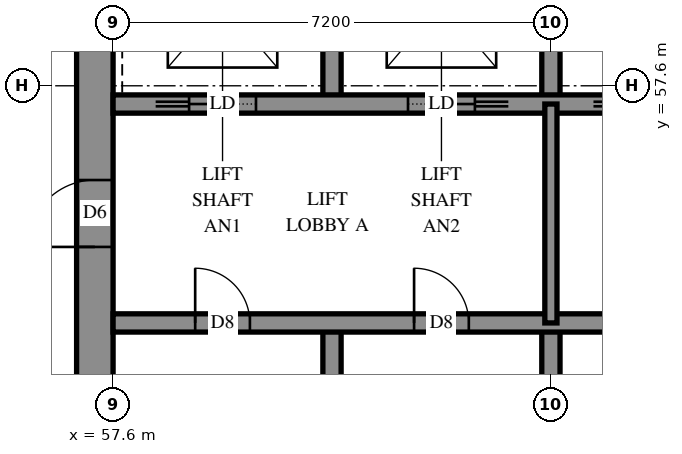
"""IFC4 building model, lengths in metres.
Left out: names, types, materials, properties, quantities, classifications, styles, units other than length and angle.
Written with IfcOpenShell. Run it as: python <this file> out.ifc"""

import sys

from ifc_helpers import new_model, si_unit, direction, frame, frame_2d, origin, place, context, subcontext, project, spatial, rectangle, extrude, element, fill, save


model = new_model("IFC4")
c1 = context("Model", 3, precision=1e-05, world=origin(), true_north=direction((0.0, 1.0)))
c2 = subcontext(c1, "Body", "Model", "MODEL_VIEW")
j1 = project(units=[si_unit("LENGTHUNIT", "METRE"), si_unit("PLANEANGLEUNIT", "RADIAN")], contexts=[c1])
p1 = place(None, origin())
s1 = spatial("IfcSite", under=j1, at=p1, CompositionType="ELEMENT")
p2 = place(p1, origin())
s2 = spatial("IfcBuilding", under=s1, at=p2, CompositionType="ELEMENT")
p3 = place(p2, frame((0.0, 0.0, 166.0)))
s3 = spatial("IfcBuildingStorey", under=s2, at=p3, CompositionType="ELEMENT", Elevation=166.0)
p4 = place(p3, frame((57.3, 50.4, -0.3), z_axis=(0.0, 0.0, 1.0), x_axis=(0.0, 1.0, 0.0)))
e1 = element("IfcWall", 1, at=p4, inside=s3, PredefinedType="SHEAR", context=c2, shape_type="SweptSolid", body=[
    extrude(rectangle(XDim=14.4, YDim=0.6, at=frame_2d((7.2, 0.0))), origin(), (0.0, 0.0, 1.0), 2.7),
])
p5 = place(p4, frame((4.55, 0.0, 0.3)))
e2 = element("IfcOpeningElement", 2, at=p5, cuts=e1, PredefinedType="OPENING", context=c2, shape_type="SweptSolid", body=[
    extrude(rectangle(XDim=1.1, YDim=2.1, at=frame_2d((0.55, 1.05))), frame((0.0, 0.31, 0.0), z_axis=(0.0, -1.0, 0.0), x_axis=(1.0, 0.0, 0.0)), (0.0, 0.0, 1.0), 0.62),
])
p6 = place(p4, frame((11.35, 0.0, 0.3)))
e3 = element("IfcOpeningElement", 3, at=p6, cuts=e1, PredefinedType="OPENING", context=c2, shape_type="SweptSolid", body=[
    extrude(rectangle(XDim=1.1, YDim=2.1, at=frame_2d((0.55, 1.05))), frame((0.0, 0.31, 0.0), z_axis=(0.0, -1.0, 0.0), x_axis=(1.0, 0.0, 0.0)), (0.0, 0.0, 1.0), 0.62),
])
for number, where, z_axis, x_axis in (
    (4, (61.2, 50.4, 0.0), (0.0, 0.0, 1.0), (0.0, 1.0, 0.0)),
    (5, (61.2, 57.3, 0.0), (0.0, 0.0, 1.0), (0.0, 1.0, 0.0)),
    (6, (64.8, 50.4, 0.0), (0.0, 0.0, 1.0), (0.0, 1.0, 0.0)),
    (7, (64.8, 57.3, 0.0), (0.0, 0.0, 1.0), (0.0, 1.0, 0.0)),
):
    element("IfcWall", number, at=place(p3, frame(where, z_axis=z_axis, x_axis=x_axis)), inside=s3, PredefinedType="SOLIDWALL", context=c2, shape_type="SweptSolid", body=[
        extrude(rectangle(XDim=3.3, YDim=0.3, at=frame_2d((1.65, 0.0))), origin(), (0.0, 0.0, 1.0), 3.1),
    ])
p7 = place(p3, frame((57.6, 53.7, 0.0), z_axis=(0.0, 0.0, 1.0), x_axis=(1.0, 0.0, 0.0)))
e8 = element("IfcWall", 8, at=p7, inside=s3, PredefinedType="SOLIDWALL", context=c2, shape_type="SweptSolid", body=[
    extrude(rectangle(XDim=14.4, YDim=0.3, at=frame_2d((7.2, 0.0))), origin(), (0.0, 0.0, 1.0), 3.1),
])
p8 = place(p7, frame((1.35, 0.0, 0.0)))
e9 = element("IfcOpeningElement", 9, at=p8, cuts=e8, PredefinedType="OPENING", context=c2, shape_type="SweptSolid", body=[
    extrude(rectangle(XDim=0.9, YDim=2.1, at=frame_2d((0.45, 1.05))), frame((0.0, 0.16, 0.0), z_axis=(0.0, -1.0, 0.0), x_axis=(1.0, 0.0, 0.0)), (0.0, 0.0, 1.0), 0.32),
])
p9 = place(p7, frame((4.95, 0.0, 0.0)))
e10 = element("IfcOpeningElement", 10, at=p9, cuts=e8, PredefinedType="OPENING", context=c2, shape_type="SweptSolid", body=[
    extrude(rectangle(XDim=0.9, YDim=2.1, at=frame_2d((0.45, 1.05))), frame((0.0, 0.16, 0.0), z_axis=(0.0, -1.0, 0.0), x_axis=(1.0, 0.0, 0.0)), (0.0, 0.0, 1.0), 0.32),
])
p10 = place(p7, frame((8.55, 0.0, 0.0)))
e11 = element("IfcOpeningElement", 11, at=p10, cuts=e8, PredefinedType="OPENING", context=c2, shape_type="SweptSolid", body=[
    extrude(rectangle(XDim=0.9, YDim=2.1, at=frame_2d((0.45, 1.05))), frame((0.0, 0.16, 0.0), z_axis=(0.0, -1.0, 0.0), x_axis=(1.0, 0.0, 0.0)), (0.0, 0.0, 1.0), 0.32),
])
p11 = place(p7, frame((12.05, 0.0, 0.0)))
e12 = element("IfcOpeningElement", 12, at=p11, cuts=e8, PredefinedType="OPENING", context=c2, shape_type="SweptSolid", body=[
    extrude(rectangle(XDim=1.1, YDim=2.1, at=frame_2d((0.55, 1.05))), frame((0.0, 0.16, 0.0), z_axis=(0.0, -1.0, 0.0), x_axis=(1.0, 0.0, 0.0)), (0.0, 0.0, 1.0), 0.32),
])
p12 = place(p3, frame((57.6, 57.3, 0.0), z_axis=(0.0, 0.0, 1.0), x_axis=(1.0, 0.0, 0.0)))
e13 = element("IfcWall", 13, at=p12, inside=s3, PredefinedType="SOLIDWALL", context=c2, shape_type="SweptSolid", body=[
    extrude(rectangle(XDim=14.4, YDim=0.3, at=frame_2d((7.2, 0.0))), origin(), (0.0, 0.0, 1.0), 3.1),
])
p13 = place(p12, frame((1.25, 0.0, 0.0)))
e14 = element("IfcOpeningElement", 14, at=p13, cuts=e13, PredefinedType="OPENING", context=c2, shape_type="SweptSolid", body=[
    extrude(rectangle(XDim=1.1, YDim=2.1, at=frame_2d((0.55, 1.05))), frame((0.0, 0.16, 0.0), z_axis=(0.0, -1.0, 0.0), x_axis=(1.0, 0.0, 0.0)), (0.0, 0.0, 1.0), 0.32),
])
p14 = place(p12, frame((4.85, 0.0, 0.0)))
e15 = element("IfcOpeningElement", 15, at=p14, cuts=e13, PredefinedType="OPENING", context=c2, shape_type="SweptSolid", body=[
    extrude(rectangle(XDim=1.1, YDim=2.1, at=frame_2d((0.55, 1.05))), frame((0.0, 0.16, 0.0), z_axis=(0.0, -1.0, 0.0), x_axis=(1.0, 0.0, 0.0)), (0.0, 0.0, 1.0), 0.32),
])
p15 = place(p12, frame((8.45, 0.0, 0.0)))
e16 = element("IfcOpeningElement", 16, at=p15, cuts=e13, PredefinedType="OPENING", context=c2, shape_type="SweptSolid", body=[
    extrude(rectangle(XDim=1.1, YDim=2.1, at=frame_2d((0.55, 1.05))), frame((0.0, 0.16, 0.0), z_axis=(0.0, -1.0, 0.0), x_axis=(1.0, 0.0, 0.0)), (0.0, 0.0, 1.0), 0.32),
])
p16 = place(p12, frame((12.05, 0.0, 0.0)))
e17 = element("IfcOpeningElement", 17, at=p16, cuts=e13, PredefinedType="OPENING", context=c2, shape_type="SweptSolid", body=[
    extrude(rectangle(XDim=1.1, YDim=2.1, at=frame_2d((0.55, 1.05))), frame((0.0, 0.16, 0.0), z_axis=(0.0, -1.0, 0.0), x_axis=(1.0, 0.0, 0.0)), (0.0, 0.0, 1.0), 0.32),
])
p17 = place(p3, frame((64.8, 53.7, 0.0), z_axis=(0.0, 0.0, 1.0), x_axis=(0.0, 1.0, 0.0)))
e18 = element("IfcWall", 18, at=p17, inside=s3, PredefinedType="PARTITIONING", context=c2, shape_type="SweptSolid", body=[
    extrude(rectangle(XDim=3.6, YDim=0.2, at=frame_2d((1.8, 0.0))), origin(), (0.0, 0.0, 1.0), 3.1),
])
p18 = place(p5, origin())
e19 = element("IfcDoor", 19, at=p18, inside=s3, OperationType="DOUBLE_DOOR_SINGLE_SWING", PredefinedType="DOOR", context=c2, shape_type="SweptSolid", body=[
    extrude(rectangle(XDim=1.1, YDim=2.1, at=frame_2d((0.55, 1.05))), frame((0.0, 0.025, 0.0), z_axis=(0.0, -1.0, 0.0), x_axis=(1.0, 0.0, 0.0)), (0.0, 0.0, 1.0), 0.05),
])
fill(e2, e19)
p19 = place(p8, origin())
e20 = element("IfcDoor", 20, at=p19, inside=s3, OperationType="SINGLE_SWING_LEFT", PredefinedType="DOOR", context=c2, shape_type="SweptSolid", body=[
    extrude(rectangle(XDim=0.9, YDim=2.1, at=frame_2d((0.45, 1.05))), frame((0.0, 0.025, 0.0), z_axis=(0.0, -1.0, 0.0), x_axis=(1.0, 0.0, 0.0)), (0.0, 0.0, 1.0), 0.05),
])
fill(e9, e20)
p20 = place(p9, origin())
e21 = element("IfcDoor", 21, at=p20, inside=s3, OperationType="SINGLE_SWING_LEFT", PredefinedType="DOOR", context=c2, shape_type="SweptSolid", body=[
    extrude(rectangle(XDim=0.9, YDim=2.1, at=frame_2d((0.45, 1.05))), frame((0.0, 0.025, 0.0), z_axis=(0.0, -1.0, 0.0), x_axis=(1.0, 0.0, 0.0)), (0.0, 0.0, 1.0), 0.05),
])
fill(e10, e21)
p21 = place(p13, origin())
e22 = element("IfcDoor", 22, at=p21, inside=s3, OperationType="SLIDING_TO_LEFT", PredefinedType="DOOR", context=c2, shape_type="SweptSolid", body=[
    extrude(rectangle(XDim=1.1, YDim=2.1, at=frame_2d((0.55, 1.05))), frame((0.0, 0.025, 0.0), z_axis=(0.0, -1.0, 0.0), x_axis=(1.0, 0.0, 0.0)), (0.0, 0.0, 1.0), 0.05),
])
fill(e14, e22)
p22 = place(p14, origin())
e23 = element("IfcDoor", 23, at=p22, inside=s3, OperationType="SLIDING_TO_RIGHT", PredefinedType="DOOR", context=c2, shape_type="SweptSolid", body=[
    extrude(rectangle(XDim=1.1, YDim=2.1, at=frame_2d((0.55, 1.05))), frame((0.0, 0.025, 0.0), z_axis=(0.0, -1.0, 0.0), x_axis=(1.0, 0.0, 0.0)), (0.0, 0.0, 1.0), 0.05),
])
fill(e15, e23)
save(model, sys.argv[1])
